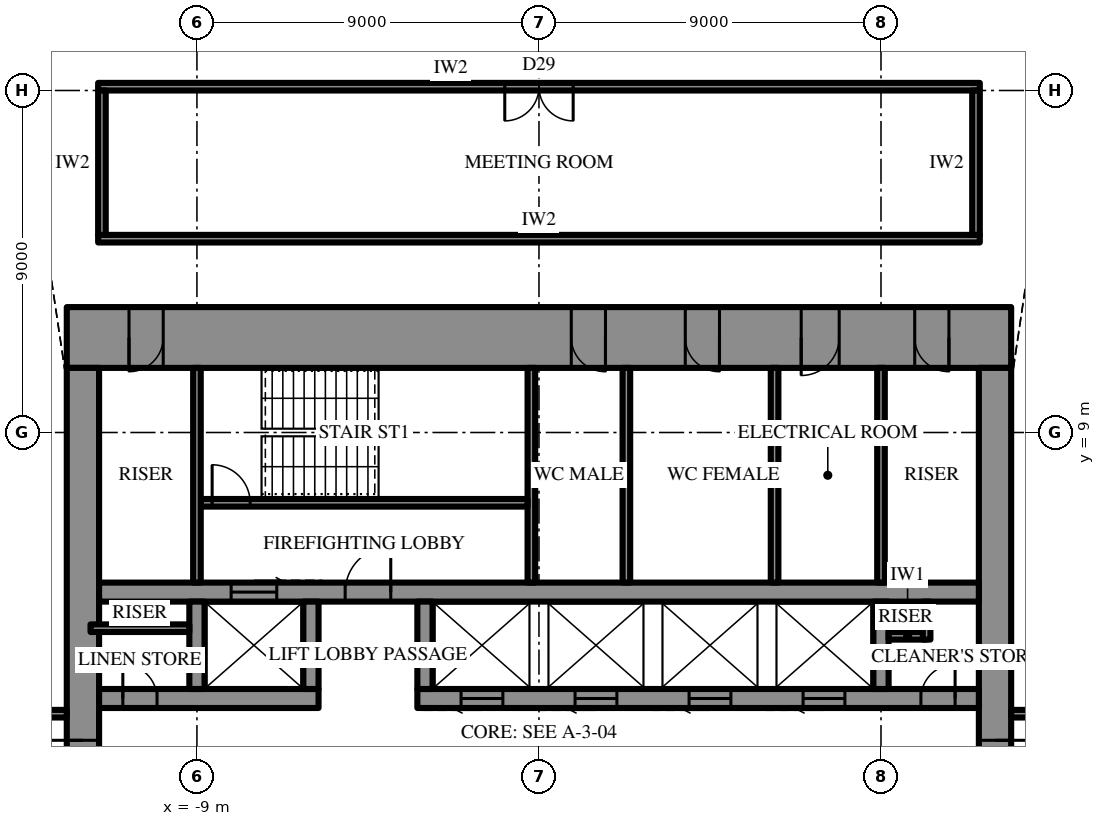
"""IFC4 building model, lengths in metres.
Left out: names, types, materials, properties, quantities, classifications, styles, units other than length and angle.
Written with IfcOpenShell. Run it as: python <this file> out.ifc"""

import sys

from ifc_helpers import new_model, si_unit, direction, frame, frame_2d, origin, place, context, subcontext, project, spatial, rectangle, extrude, element, fill, save


model = new_model("IFC4")
c1 = context("Model", 3, precision=1e-05, world=origin(), true_north=direction((0.0, 1.0)))
c2 = subcontext(c1, "Body", "Model", "MODEL_VIEW")
j1 = project(units=[si_unit("LENGTHUNIT", "METRE"), si_unit("PLANEANGLEUNIT", "RADIAN")], contexts=[c1])
p1 = place(None, origin())
s1 = spatial("IfcSite", under=j1, at=p1, CompositionType="ELEMENT")
p2 = place(p1, origin())
s2 = spatial("IfcBuilding", under=s1, at=p2, CompositionType="ELEMENT")
p3 = place(p2, frame((0.0, 0.0, 324.1)))
s3 = spatial("IfcBuildingStorey", under=s2, at=p3, CompositionType="ELEMENT", Elevation=324.1)
p4 = place(p3, frame((-12.425, 11.5, 0.0), z_axis=(0.0, 0.0, 1.0), x_axis=(1.0, 0.0, 0.0)))
e1 = element("IfcWall", 1, at=p4, inside=s3, PredefinedType="SHEAR", context=c2, shape_type="SweptSolid", body=[
    extrude(rectangle(XDim=24.85, YDim=1.6, at=frame_2d((12.425, 0.0))), origin(), (0.0, 0.0, 1.0), 4.2),
])
p5 = place(p4, frame((13.275, 0.0, 0.0)))
e2 = element("IfcOpeningElement", 2, at=p5, cuts=e1, PredefinedType="OPENING", context=c2, shape_type="SweptSolid", body=[
    extrude(rectangle(XDim=0.9, YDim=2.2, at=frame_2d((0.45, 1.1))), frame((0.0, 0.81, 0.0), z_axis=(0.0, -1.0, 0.0), x_axis=(1.0, 0.0, 0.0)), (0.0, 0.0, 1.0), 1.62),
])
p6 = place(p4, frame((16.275, 0.0, 0.0)))
e3 = element("IfcOpeningElement", 3, at=p6, cuts=e1, PredefinedType="OPENING", context=c2, shape_type="SweptSolid", body=[
    extrude(rectangle(XDim=0.9, YDim=2.2, at=frame_2d((0.45, 1.1))), frame((0.0, 0.81, 0.0), z_axis=(0.0, -1.0, 0.0), x_axis=(1.0, 0.0, 0.0)), (0.0, 0.0, 1.0), 1.62),
])
p7 = place(p4, frame((19.325, 0.0, 0.0)))
e4 = element("IfcOpeningElement", 4, at=p7, cuts=e1, PredefinedType="OPENING", context=c2, shape_type="SweptSolid", body=[
    extrude(rectangle(XDim=1.0, YDim=2.2, at=frame_2d((0.5, 1.1))), frame((0.0, 0.81, 0.0), z_axis=(0.0, -1.0, 0.0), x_axis=(1.0, 0.0, 0.0)), (0.0, 0.0, 1.0), 1.62),
])
p8 = place(p4, frame((1.637, 0.0, 0.0)))
e5 = element("IfcOpeningElement", 5, at=p8, cuts=e1, PredefinedType="OPENING", context=c2, shape_type="SweptSolid", body=[
    extrude(rectangle(XDim=0.9, YDim=2.2, at=frame_2d((0.45, 1.1))), frame((0.0, 0.81, 0.0), z_axis=(0.0, -1.0, 0.0), x_axis=(1.0, 0.0, 0.0)), (0.0, 0.0, 1.0), 1.62),
])
p9 = place(p4, frame((22.312, 0.0, 0.0)))
e6 = element("IfcOpeningElement", 6, at=p9, cuts=e1, PredefinedType="OPENING", context=c2, shape_type="SweptSolid", body=[
    extrude(rectangle(XDim=0.9, YDim=2.2, at=frame_2d((0.45, 1.1))), frame((0.0, 0.81, 0.0), z_axis=(0.0, -1.0, 0.0), x_axis=(1.0, 0.0, 0.0)), (0.0, 0.0, 1.0), 1.62),
])
p10 = place(p3, frame((12.0, -10.7, 0.0), z_axis=(0.0, 0.0, 1.0), x_axis=(0.0, 1.0, 0.0)))
e7 = element("IfcWall", 7, at=p10, inside=s3, PredefinedType="SHEAR", context=c2, shape_type="SweptSolid", body=[
    extrude(rectangle(XDim=21.4, YDim=0.85, at=frame_2d((10.7, 0.0))), origin(), (0.0, 0.0, 1.0), 4.2),
])
p11 = place(p10, frame((9.8, 0.0, 0.0)))
e8 = element("IfcOpeningElement", 8, at=p11, cuts=e7, PredefinedType="OPENING", context=c2, shape_type="SweptSolid", body=[
    extrude(rectangle(XDim=1.8, YDim=2.4, at=frame_2d((0.9, 1.2))), frame((0.0, 0.435, 0.0), z_axis=(0.0, -1.0, 0.0), x_axis=(1.0, 0.0, 0.0)), (0.0, 0.0, 1.0), 0.87),
])
p12 = place(p3, frame((-12.0, 10.7, 0.0), z_axis=(0.0, 0.0, 1.0), x_axis=(0.0, -1.0, 0.0)))
e9 = element("IfcWall", 9, at=p12, inside=s3, PredefinedType="SHEAR", context=c2, shape_type="SweptSolid", body=[
    extrude(rectangle(XDim=21.4, YDim=0.85, at=frame_2d((10.7, 0.0))), origin(), (0.0, 0.0, 1.0), 4.2),
])
p13 = place(p12, frame((9.8, 0.0, 0.0)))
e10 = element("IfcOpeningElement", 10, at=p13, cuts=e9, PredefinedType="OPENING", context=c2, shape_type="SweptSolid", body=[
    extrude(rectangle(XDim=1.8, YDim=2.4, at=frame_2d((0.9, 1.2))), frame((0.0, 0.435, 0.0), z_axis=(0.0, -1.0, 0.0), x_axis=(1.0, 0.0, 0.0)), (0.0, 0.0, 1.0), 0.87),
])
p14 = place(p3, frame((-11.575, 2.0, 0.0), z_axis=(0.0, 0.0, 1.0), x_axis=(1.0, 0.0, 0.0)))
e11 = element("IfcWall", 11, at=p14, inside=s3, PredefinedType="SHEAR", context=c2, shape_type="SweptSolid", body=[
    extrude(rectangle(XDim=5.775, YDim=0.5, at=frame_2d((2.887, 0.0))), origin(), (0.0, 0.0, 1.0), 4.2),
])
p15 = place(p14, frame((0.625, 0.0, 0.0)))
e12 = element("IfcOpeningElement", 12, at=p15, cuts=e11, PredefinedType="OPENING", context=c2, shape_type="SweptSolid", body=[
    extrude(rectangle(XDim=0.9, YDim=2.2, at=frame_2d((0.45, 1.1))), frame((0.0, 0.26, 0.0), z_axis=(0.0, -1.0, 0.0), x_axis=(1.0, 0.0, 0.0)), (0.0, 0.0, 1.0), 0.52),
])
p16 = place(p3, frame((-3.2, 2.0, 0.0), z_axis=(0.0, 0.0, 1.0), x_axis=(1.0, 0.0, 0.0)))
e13 = element("IfcWall", 13, at=p16, inside=s3, PredefinedType="SHEAR", context=c2, shape_type="SweptSolid", body=[
    extrude(rectangle(XDim=14.775, YDim=0.5, at=frame_2d((7.387, 0.0))), origin(), (0.0, 0.0, 1.0), 4.2),
])
p17 = place(p16, frame((13.25, 0.0, 0.0)))
e14 = element("IfcOpeningElement", 14, at=p17, cuts=e13, PredefinedType="OPENING", context=c2, shape_type="SweptSolid", body=[
    extrude(rectangle(XDim=0.9, YDim=2.2, at=frame_2d((0.45, 1.1))), frame((0.0, 0.26, 0.0), z_axis=(0.0, -1.0, 0.0), x_axis=(1.0, 0.0, 0.0)), (0.0, 0.0, 1.0), 0.52),
])
p18 = place(p16, frame((1.15, 0.0, 0.0)))
e15 = element("IfcOpeningElement", 15, at=p18, cuts=e13, PredefinedType="OPENING", context=c2, shape_type="SweptSolid", body=[
    extrude(rectangle(XDim=1.1, YDim=2.2, at=frame_2d((0.55, 1.1))), frame((0.0, 0.26, 0.0), z_axis=(0.0, -1.0, 0.0), x_axis=(1.0, 0.0, 0.0)), (0.0, 0.0, 1.0), 0.52),
])
p19 = place(p16, frame((4.15, 0.0, 0.0)))
e16 = element("IfcOpeningElement", 16, at=p19, cuts=e13, PredefinedType="OPENING", context=c2, shape_type="SweptSolid", body=[
    extrude(rectangle(XDim=1.1, YDim=2.2, at=frame_2d((0.55, 1.1))), frame((0.0, 0.26, 0.0), z_axis=(0.0, -1.0, 0.0), x_axis=(1.0, 0.0, 0.0)), (0.0, 0.0, 1.0), 0.52),
])
p20 = place(p16, frame((7.15, 0.0, 0.0)))
e17 = element("IfcOpeningElement", 17, at=p20, cuts=e13, PredefinedType="OPENING", context=c2, shape_type="SweptSolid", body=[
    extrude(rectangle(XDim=1.1, YDim=2.2, at=frame_2d((0.55, 1.1))), frame((0.0, 0.26, 0.0), z_axis=(0.0, -1.0, 0.0), x_axis=(1.0, 0.0, 0.0)), (0.0, 0.0, 1.0), 0.52),
])
p21 = place(p16, frame((10.15, 0.0, 0.0)))
e18 = element("IfcOpeningElement", 18, at=p21, cuts=e13, PredefinedType="OPENING", context=c2, shape_type="SweptSolid", body=[
    extrude(rectangle(XDim=1.1, YDim=2.2, at=frame_2d((0.55, 1.1))), frame((0.0, 0.26, 0.0), z_axis=(0.0, -1.0, 0.0), x_axis=(1.0, 0.0, 0.0)), (0.0, 0.0, 1.0), 0.52),
])
p22 = place(p3, frame((-11.575, 4.8, 0.0), z_axis=(0.0, 0.0, 1.0), x_axis=(1.0, 0.0, 0.0)))
e19 = element("IfcWall", 19, at=p22, inside=s3, PredefinedType="SHEAR", context=c2, shape_type="SweptSolid", body=[
    extrude(rectangle(XDim=23.15, YDim=0.5, at=frame_2d((11.575, 0.0))), origin(), (0.0, 0.0, 1.0), 4.2),
])
p23 = place(p22, frame((6.475, 0.0, 0.0)))
e20 = element("IfcOpeningElement", 20, at=p23, cuts=e19, PredefinedType="OPENING", context=c2, shape_type="SweptSolid", body=[
    extrude(rectangle(XDim=1.2, YDim=2.2, at=frame_2d((0.6, 1.1))), frame((0.0, 0.26, 0.0), z_axis=(0.0, -1.0, 0.0), x_axis=(1.0, 0.0, 0.0)), (0.0, 0.0, 1.0), 0.52),
])
p24 = place(p22, frame((3.475, 0.0, 0.0)))
e21 = element("IfcOpeningElement", 21, at=p24, cuts=e19, PredefinedType="OPENING", context=c2, shape_type="SweptSolid", body=[
    extrude(rectangle(XDim=1.2, YDim=2.2, at=frame_2d((0.6, 1.1))), frame((0.0, 0.26, 0.0), z_axis=(0.0, -1.0, 0.0), x_axis=(1.0, 0.0, 0.0)), (0.0, 0.0, 1.0), 0.52),
])
for number, where, z_axis, x_axis in (
    (22, (-9.0, 2.25, 0.0), (0.0, 0.0, 1.0), (0.0, 1.0, 0.0)),
    (23, (-6.0, 2.25, 0.0), (0.0, 0.0, 1.0), (0.0, 1.0, 0.0)),
    (24, (-3.0, 2.25, 0.0), (0.0, 0.0, 1.0), (0.0, 1.0, 0.0)),
    (25, (9.0, 2.25, 0.0), (0.0, 0.0, 1.0), (0.0, 1.0, 0.0)),
):
    element("IfcWall", number, at=place(p3, frame(where, z_axis=z_axis, x_axis=x_axis)), inside=s3, PredefinedType="SHEAR", context=c2, shape_type="SweptSolid", body=[
        extrude(rectangle(XDim=2.3, YDim=0.4, at=frame_2d((1.15, 0.0))), origin(), (0.0, 0.0, 1.0), 4.2),
    ])
p25 = place(p3, frame((-0.2, 5.05, 0.0), z_axis=(0.0, 0.0, 1.0), x_axis=(0.0, 1.0, 0.0)))
e26 = element("IfcWall", 26, at=p25, inside=s3, PredefinedType="SHEAR", context=c2, shape_type="SweptSolid", body=[
    extrude(rectangle(XDim=5.65, YDim=0.2, at=frame_2d((2.825, 0.0))), origin(), (0.0, 0.0, 1.0), 4.2),
])
p26 = place(p3, frame((-8.9, 7.15, 0.0), z_axis=(0.0, 0.0, 1.0), x_axis=(1.0, 0.0, 0.0)))
e27 = element("IfcWall", 27, at=p26, inside=s3, PredefinedType="SHEAR", context=c2, shape_type="SweptSolid", body=[
    extrude(rectangle(XDim=8.6, YDim=0.2, at=frame_2d((4.3, 0.0))), origin(), (0.0, 0.0, 1.0), 4.2),
])
p27 = place(p26, frame((0.3, 0.0, 0.0)))
e28 = element("IfcOpeningElement", 28, at=p27, cuts=e27, PredefinedType="OPENING", context=c2, shape_type="SweptSolid", body=[
    extrude(rectangle(XDim=1.0, YDim=2.2, at=frame_2d((0.5, 1.1))), frame((0.0, 0.11, 0.0), z_axis=(0.0, -1.0, 0.0), x_axis=(1.0, 0.0, 0.0)), (0.0, 0.0, 1.0), 0.22),
])
for number, where, z_axis, x_axis in (
    (29, (-9.0, 5.05, 0.0), (0.0, 0.0, 1.0), (0.0, 1.0, 0.0)),
    (30, (9.0, 5.05, 0.0), (0.0, 0.0, 1.0), (0.0, 1.0, 0.0)),
    (31, (2.3, 5.05, 0.0), (0.0, 0.0, 1.0), (0.0, 1.0, 0.0)),
    (32, (6.2, 5.05, 0.0), (0.0, 0.0, 1.0), (0.0, 1.0, 0.0)),
):
    element("IfcWall", number, at=place(p3, frame(where, z_axis=z_axis, x_axis=x_axis)), inside=s3, PredefinedType="PARTITIONING", context=c2, shape_type="SweptSolid", body=[
        extrude(rectangle(XDim=5.65, YDim=0.2, at=frame_2d((2.825, 0.0))), origin(), (0.0, 0.0, 1.0), 4.0),
    ])
p28 = place(p3, frame((-11.8, 3.85, 0.0), z_axis=(0.0, 0.0, 1.0), x_axis=(1.0, 0.0, 0.0)))
e33 = element("IfcWall", 33, at=p28, inside=s3, PredefinedType="PARTITIONING", context=c2, shape_type="SweptSolid", body=[
    extrude(rectangle(XDim=2.6, YDim=0.2, at=frame_2d((1.3, 0.0))), origin(), (0.0, 0.0, 1.0), 4.0),
])
for number, where, z_axis, x_axis in (
    (34, (9.2, 3.65, 0.0), (0.0, 0.0, 1.0), (1.0, 0.0, 0.0)),
    (35, (10.2, 3.55, 0.0), (0.0, 0.0, 1.0), (0.0, 1.0, 0.0)),
):
    element("IfcWall", number, at=place(p3, frame(where, z_axis=z_axis, x_axis=x_axis)), inside=s3, PredefinedType="PARTITIONING", context=c2, shape_type="SweptSolid", body=[
        extrude(rectangle(XDim=1.0, YDim=0.2, at=frame_2d((0.5, 0.0))), origin(), (0.0, 0.0, 1.0), 4.0),
    ])
p29 = place(p3, frame((-11.6, 14.1, 0.0), z_axis=(0.0, 0.0, 1.0), x_axis=(1.0, 0.0, 0.0)))
e36 = element("IfcWall", 36, at=p29, inside=s3, PredefinedType="PARTITIONING", context=c2, shape_type="SweptSolid", body=[
    extrude(rectangle(XDim=23.2, YDim=0.2, at=frame_2d((11.6, 0.0))), origin(), (0.0, 0.0, 1.0), 4.0),
])
p30 = place(p3, frame((-11.6, 18.1, 0.0), z_axis=(0.0, 0.0, 1.0), x_axis=(1.0, 0.0, 0.0)))
e37 = element("IfcWall", 37, at=p30, inside=s3, PredefinedType="PARTITIONING", context=c2, shape_type="SweptSolid", body=[
    extrude(rectangle(XDim=23.2, YDim=0.2, at=frame_2d((11.6, 0.0))), origin(), (0.0, 0.0, 1.0), 4.0),
])
p31 = place(p30, frame((10.7, 0.0, 0.0)))
e38 = element("IfcOpeningElement", 38, at=p31, cuts=e37, PredefinedType="OPENING", context=c2, shape_type="SweptSolid", body=[
    extrude(rectangle(XDim=1.8, YDim=2.4, at=frame_2d((0.9, 1.2))), frame((0.0, 0.11, 0.0), z_axis=(0.0, -1.0, 0.0), x_axis=(1.0, 0.0, 0.0)), (0.0, 0.0, 1.0), 0.22),
])
for number, where, z_axis, x_axis in (
    (39, (-11.5, 14.2, 0.0), (0.0, 0.0, 1.0), (0.0, 1.0, 0.0)),
    (40, (11.5, 14.2, 0.0), (0.0, 0.0, 1.0), (0.0, 1.0, 0.0)),
):
    element("IfcWall", number, at=place(p3, frame(where, z_axis=z_axis, x_axis=x_axis)), inside=s3, PredefinedType="PARTITIONING", context=c2, shape_type="SweptSolid", body=[
        extrude(rectangle(XDim=3.8, YDim=0.2, at=frame_2d((1.9, 0.0))), origin(), (0.0, 0.0, 1.0), 4.0),
    ])
p32 = place(p3, frame((12.425, 1.6, 0.0), z_axis=(0.0, 0.0, 1.0), x_axis=(1.0, 0.0, 0.0)))
e41 = element("IfcWall", 41, at=p32, inside=s3, PredefinedType="PARTITIONING", context=c2, shape_type="SweptSolid", body=[
    extrude(rectangle(XDim=16.327, YDim=0.2, at=frame_2d((8.164, 0.0))), origin(), (0.0, 0.0, 1.0), 4.0),
])
p33 = place(p32, frame((1.133, 0.0, 0.0)))
e42 = element("IfcOpeningElement", 42, at=p33, cuts=e41, PredefinedType="OPENING", context=c2, shape_type="SweptSolid", body=[
    extrude(rectangle(XDim=1.0, YDim=2.2, at=frame_2d((0.5, 1.1))), frame((0.0, 0.11, 0.0), z_axis=(0.0, -1.0, 0.0), x_axis=(1.0, 0.0, 0.0)), (0.0, 0.0, 1.0), 0.22),
])
p34 = place(p3, frame((-12.425, 1.6, 0.0), z_axis=(0.0, 0.0, 1.0), x_axis=(-1.0, 0.0, 0.0)))
e43 = element("IfcWall", 43, at=p34, inside=s3, PredefinedType="PARTITIONING", context=c2, shape_type="SweptSolid", body=[
    extrude(rectangle(XDim=16.327, YDim=0.2, at=frame_2d((8.164, 0.0))), origin(), (0.0, 0.0, 1.0), 4.0),
])
p35 = place(p34, frame((1.133, 0.0, 0.0)))
e44 = element("IfcOpeningElement", 44, at=p35, cuts=e43, PredefinedType="OPENING", context=c2, shape_type="SweptSolid", body=[
    extrude(rectangle(XDim=1.0, YDim=2.2, at=frame_2d((0.5, 1.1))), frame((0.0, 0.11, 0.0), z_axis=(0.0, -1.0, 0.0), x_axis=(1.0, 0.0, 0.0)), (0.0, 0.0, 1.0), 0.22),
])
p36 = place(p11, frame((1.8, 0.0, 0.0), z_axis=(0.0, 0.0, 1.0), x_axis=(-1.0, 0.0, 0.0)))
e45 = element("IfcDoor", 45, at=p36, inside=s3, OperationType="DOUBLE_DOOR_SINGLE_SWING", PredefinedType="DOOR", context=c2, shape_type="SweptSolid", body=[
    extrude(rectangle(XDim=1.8, YDim=2.4, at=frame_2d((0.9, 1.2))), frame((0.0, 0.025, 0.0), z_axis=(0.0, -1.0, 0.0), x_axis=(1.0, 0.0, 0.0)), (0.0, 0.0, 1.0), 0.05),
])
fill(e8, e45)
p37 = place(p13, frame((1.8, 0.0, 0.0), z_axis=(0.0, 0.0, 1.0), x_axis=(-1.0, 0.0, 0.0)))
e46 = element("IfcDoor", 46, at=p37, inside=s3, OperationType="DOUBLE_DOOR_SINGLE_SWING", PredefinedType="DOOR", context=c2, shape_type="SweptSolid", body=[
    extrude(rectangle(XDim=1.8, YDim=2.4, at=frame_2d((0.9, 1.2))), frame((0.0, 0.025, 0.0), z_axis=(0.0, -1.0, 0.0), x_axis=(1.0, 0.0, 0.0)), (0.0, 0.0, 1.0), 0.05),
])
fill(e10, e46)
p38 = place(p23, origin())
e47 = element("IfcDoor", 47, at=p38, inside=s3, OperationType="SINGLE_SWING_LEFT", PredefinedType="DOOR", context=c2, shape_type="SweptSolid", body=[
    extrude(rectangle(XDim=1.2, YDim=2.2, at=frame_2d((0.6, 1.1))), frame((0.0, 0.025, 0.0), z_axis=(0.0, -1.0, 0.0), x_axis=(1.0, 0.0, 0.0)), (0.0, 0.0, 1.0), 0.05),
])
fill(e20, e47)
p39 = place(p27, origin())
e48 = element("IfcDoor", 48, at=p39, inside=s3, OperationType="SINGLE_SWING_RIGHT", PredefinedType="DOOR", context=c2, shape_type="SweptSolid", body=[
    extrude(rectangle(XDim=1.0, YDim=2.2, at=frame_2d((0.5, 1.1))), frame((0.0, 0.025, 0.0), z_axis=(0.0, -1.0, 0.0), x_axis=(1.0, 0.0, 0.0)), (0.0, 0.0, 1.0), 0.05),
])
fill(e28, e48)
p40 = place(p5, frame((0.9, 0.0, 0.0), z_axis=(0.0, 0.0, 1.0), x_axis=(-1.0, 0.0, 0.0)))
e49 = element("IfcDoor", 49, at=p40, inside=s3, OperationType="SINGLE_SWING_RIGHT", PredefinedType="DOOR", context=c2, shape_type="SweptSolid", body=[
    extrude(rectangle(XDim=0.9, YDim=2.2, at=frame_2d((0.45, 1.1))), frame((0.0, 0.025, 0.0), z_axis=(0.0, -1.0, 0.0), x_axis=(1.0, 0.0, 0.0)), (0.0, 0.0, 1.0), 0.05),
])
fill(e2, e49)
p41 = place(p6, frame((0.9, 0.0, 0.0), z_axis=(0.0, 0.0, 1.0), x_axis=(-1.0, 0.0, 0.0)))
e50 = element("IfcDoor", 50, at=p41, inside=s3, OperationType="SINGLE_SWING_RIGHT", PredefinedType="DOOR", context=c2, shape_type="SweptSolid", body=[
    extrude(rectangle(XDim=0.9, YDim=2.2, at=frame_2d((0.45, 1.1))), frame((0.0, 0.025, 0.0), z_axis=(0.0, -1.0, 0.0), x_axis=(1.0, 0.0, 0.0)), (0.0, 0.0, 1.0), 0.05),
])
fill(e3, e50)
p42 = place(p7, frame((1.0, 0.0, 0.0), z_axis=(0.0, 0.0, 1.0), x_axis=(-1.0, 0.0, 0.0)))
e51 = element("IfcDoor", 51, at=p42, inside=s3, OperationType="SINGLE_SWING_LEFT", PredefinedType="DOOR", context=c2, shape_type="SweptSolid", body=[
    extrude(rectangle(XDim=1.0, YDim=2.2, at=frame_2d((0.5, 1.1))), frame((0.0, 0.025, 0.0), z_axis=(0.0, -1.0, 0.0), x_axis=(1.0, 0.0, 0.0)), (0.0, 0.0, 1.0), 0.05),
])
fill(e4, e51)
p43 = place(p8, frame((0.9, 0.0, 0.0), z_axis=(0.0, 0.0, 1.0), x_axis=(-1.0, 0.0, 0.0)))
e52 = element("IfcDoor", 52, at=p43, inside=s3, OperationType="SINGLE_SWING_LEFT", PredefinedType="DOOR", context=c2, shape_type="SweptSolid", body=[
    extrude(rectangle(XDim=0.9, YDim=2.2, at=frame_2d((0.45, 1.1))), frame((0.0, 0.025, 0.0), z_axis=(0.0, -1.0, 0.0), x_axis=(1.0, 0.0, 0.0)), (0.0, 0.0, 1.0), 0.05),
])
fill(e5, e52)
p44 = place(p9, frame((0.9, 0.0, 0.0), z_axis=(0.0, 0.0, 1.0), x_axis=(-1.0, 0.0, 0.0)))
e53 = element("IfcDoor", 53, at=p44, inside=s3, OperationType="SINGLE_SWING_RIGHT", PredefinedType="DOOR", context=c2, shape_type="SweptSolid", body=[
    extrude(rectangle(XDim=0.9, YDim=2.2, at=frame_2d((0.45, 1.1))), frame((0.0, 0.025, 0.0), z_axis=(0.0, -1.0, 0.0), x_axis=(1.0, 0.0, 0.0)), (0.0, 0.0, 1.0), 0.05),
])
fill(e6, e53)
p45 = place(p15, origin())
e54 = element("IfcDoor", 54, at=p45, inside=s3, OperationType="SINGLE_SWING_RIGHT", PredefinedType="DOOR", context=c2, shape_type="SweptSolid", body=[
    extrude(rectangle(XDim=0.9, YDim=2.2, at=frame_2d((0.45, 1.1))), frame((0.0, 0.025, 0.0), z_axis=(0.0, -1.0, 0.0), x_axis=(1.0, 0.0, 0.0)), (0.0, 0.0, 1.0), 0.05),
])
fill(e12, e54)
p46 = place(p17, origin())
e55 = element("IfcDoor", 55, at=p46, inside=s3, OperationType="SINGLE_SWING_LEFT", PredefinedType="DOOR", context=c2, shape_type="SweptSolid", body=[
    extrude(rectangle(XDim=0.9, YDim=2.2, at=frame_2d((0.45, 1.1))), frame((0.0, 0.025, 0.0), z_axis=(0.0, -1.0, 0.0), x_axis=(1.0, 0.0, 0.0)), (0.0, 0.0, 1.0), 0.05),
])
fill(e14, e55)
p47 = place(p24, origin())
e56 = element("IfcDoor", 56, at=p47, inside=s3, OperationType="SLIDING_TO_LEFT", PredefinedType="DOOR", context=c2, shape_type="SweptSolid", body=[
    extrude(rectangle(XDim=1.2, YDim=2.2, at=frame_2d((0.6, 1.1))), frame((0.0, 0.025, 0.0), z_axis=(0.0, -1.0, 0.0), x_axis=(1.0, 0.0, 0.0)), (0.0, 0.0, 1.0), 0.05),
])
fill(e21, e56)
p48 = place(p18, frame((1.1, 0.0, 0.0), z_axis=(0.0, 0.0, 1.0), x_axis=(-1.0, 0.0, 0.0)))
e57 = element("IfcDoor", 57, at=p48, inside=s3, OperationType="SLIDING_TO_LEFT", PredefinedType="DOOR", context=c2, shape_type="SweptSolid", body=[
    extrude(rectangle(XDim=1.1, YDim=2.2, at=frame_2d((0.55, 1.1))), frame((0.0, 0.025, 0.0), z_axis=(0.0, -1.0, 0.0), x_axis=(1.0, 0.0, 0.0)), (0.0, 0.0, 1.0), 0.05),
])
fill(e15, e57)
p49 = place(p19, frame((1.1, 0.0, 0.0), z_axis=(0.0, 0.0, 1.0), x_axis=(-1.0, 0.0, 0.0)))
e58 = element("IfcDoor", 58, at=p49, inside=s3, OperationType="SLIDING_TO_LEFT", PredefinedType="DOOR", context=c2, shape_type="SweptSolid", body=[
    extrude(rectangle(XDim=1.1, YDim=2.2, at=frame_2d((0.55, 1.1))), frame((0.0, 0.025, 0.0), z_axis=(0.0, -1.0, 0.0), x_axis=(1.0, 0.0, 0.0)), (0.0, 0.0, 1.0), 0.05),
])
fill(e16, e58)
p50 = place(p20, frame((1.1, 0.0, 0.0), z_axis=(0.0, 0.0, 1.0), x_axis=(-1.0, 0.0, 0.0)))
e59 = element("IfcDoor", 59, at=p50, inside=s3, OperationType="SLIDING_TO_LEFT", PredefinedType="DOOR", context=c2, shape_type="SweptSolid", body=[
    extrude(rectangle(XDim=1.1, YDim=2.2, at=frame_2d((0.55, 1.1))), frame((0.0, 0.025, 0.0), z_axis=(0.0, -1.0, 0.0), x_axis=(1.0, 0.0, 0.0)), (0.0, 0.0, 1.0), 0.05),
])
fill(e17, e59)
p51 = place(p21, frame((1.1, 0.0, 0.0), z_axis=(0.0, 0.0, 1.0), x_axis=(-1.0, 0.0, 0.0)))
e60 = element("IfcDoor", 60, at=p51, inside=s3, OperationType="SLIDING_TO_LEFT", PredefinedType="DOOR", context=c2, shape_type="SweptSolid", body=[
    extrude(rectangle(XDim=1.1, YDim=2.2, at=frame_2d((0.55, 1.1))), frame((0.0, 0.025, 0.0), z_axis=(0.0, -1.0, 0.0), x_axis=(1.0, 0.0, 0.0)), (0.0, 0.0, 1.0), 0.05),
])
fill(e18, e60)
p52 = place(p31, frame((1.8, 0.0, 0.0), z_axis=(0.0, 0.0, 1.0), x_axis=(-1.0, 0.0, 0.0)))
e61 = element("IfcDoor", 61, at=p52, inside=s3, OperationType="DOUBLE_DOOR_SINGLE_SWING", PredefinedType="DOOR", context=c2, shape_type="SweptSolid", body=[
    extrude(rectangle(XDim=1.8, YDim=2.4, at=frame_2d((0.9, 1.2))), frame((0.0, 0.025, 0.0), z_axis=(0.0, -1.0, 0.0), x_axis=(1.0, 0.0, 0.0)), (0.0, 0.0, 1.0), 0.05),
])
fill(e38, e61)
save(model, sys.argv[1])
